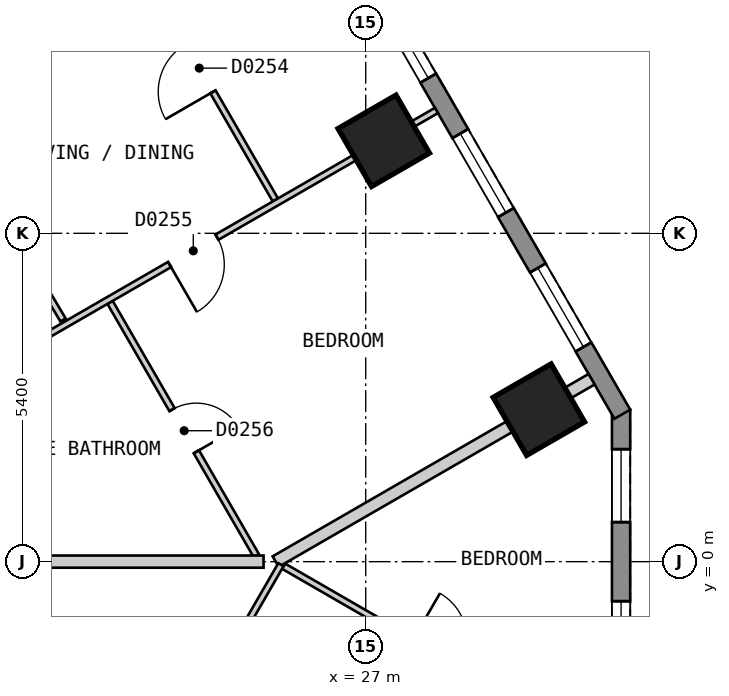
"""IFC4 building model, lengths in metres.
Left out: names, types, materials, properties, quantities, classifications, styles, units other than length and angle.
Written with IfcOpenShell. Run it as: python <this file> out.ifc"""

import sys

from ifc_helpers import new_model, si_unit, direction, frame, frame_2d, origin, origin_2d, place, context, subcontext, project, spatial, polyline, rectangle, outline, extrude, element, fill, save


model = new_model("IFC4")
c1 = context("Model", 3, precision=1e-05, world=origin(), true_north=direction((0.0, 1.0)))
c2 = subcontext(c1, "Body", "Model", "MODEL_VIEW")
j1 = project(units=[si_unit("LENGTHUNIT", "METRE"), si_unit("PLANEANGLEUNIT", "RADIAN")], contexts=[c1])
p1 = place(None, origin())
s1 = spatial("IfcSite", under=j1, at=p1, CompositionType="ELEMENT")
p2 = place(p1, origin())
s2 = spatial("IfcBuilding", under=s1, at=p2, CompositionType="ELEMENT")
p3 = place(p2, frame((0.0, 0.0, 41.4)))
s3 = spatial("IfcBuildingStorey", under=s2, at=p3, CompositionType="ELEMENT", Elevation=41.4)
for number, where, z_axis, x_axis in (
    (1, (29.848, 2.5, 0.0), (0.0, 0.0, 1.0), (-0.5, 0.866, 0.0)),
    (2, (27.297, 6.921, 0.0), (0.0, 0.0, 1.0), (-0.5, 0.866, 0.0)),
):
    element("IfcColumn", number, at=place(p3, frame(where, z_axis=z_axis, x_axis=x_axis)), inside=s3, PredefinedType="COLUMN", context=c2, shape_type="SweptSolid", body=[
        extrude(rectangle(XDim=1.1, YDim=1.1, at=origin_2d()), origin(), (0.0, 0.0, 1.0), 3.0),
    ])
p4 = place(p3, frame((31.2, -2.5, 0.0), z_axis=(0.0, 0.0, 1.0), x_axis=(0.0, 1.0, 0.0)))
e3 = element("IfcWall", 3, at=p4, inside=s3, PredefinedType="SOLIDWALL", context=c2, shape_type="SweptSolid", body=[
    extrude(outline(polyline([(0.0, -0.15), (5.0, -0.15), (4.92, 0.15), (0.08, 0.15), (0.0, -0.15)])), origin(), (0.0, 0.0, 1.0), 2.7),
])
p5 = place(p4, frame((0.65, 0.0, 0.15)))
e4 = element("IfcOpeningElement", 4, at=p5, cuts=e3, PredefinedType="OPENING", context=c2, shape_type="SweptSolid", body=[
    extrude(rectangle(XDim=1.2, YDim=2.1, at=frame_2d((0.6, 1.05))), frame((0.0, 0.16, 0.0), z_axis=(0.0, -1.0, 0.0), x_axis=(1.0, 0.0, 0.0)), (0.0, 0.0, 1.0), 0.32),
])
p6 = place(p4, frame((3.15, 0.0, 0.15)))
e5 = element("IfcOpeningElement", 5, at=p6, cuts=e3, PredefinedType="OPENING", context=c2, shape_type="SweptSolid", body=[
    extrude(rectangle(XDim=1.2, YDim=2.1, at=frame_2d((0.6, 1.05))), frame((0.0, 0.16, 0.0), z_axis=(0.0, -1.0, 0.0), x_axis=(1.0, 0.0, 0.0)), (0.0, 0.0, 1.0), 0.32),
])
p7 = place(p3, frame((31.22, 2.425, 0.0), z_axis=(0.0, 0.0, 1.0), x_axis=(-0.500001938803, 0.866024284413, 0.0)))
e6 = element("IfcWall", 6, at=p7, inside=s3, PredefinedType="SOLIDWALL", context=c2, shape_type="SweptSolid", body=[
    extrude(outline(polyline([(0.0, -0.15), (27.02, -0.15), (26.94, 0.15), (0.08, 0.15), (0.0, -0.15)])), origin(), (0.0, 0.0, 1.0), 2.7),
])
p8 = place(p7, frame((1.277, 0.0, 0.15)))
e7 = element("IfcOpeningElement", 7, at=p8, cuts=e6, PredefinedType="OPENING", context=c2, shape_type="SweptSolid", body=[
    extrude(rectangle(XDim=1.5, YDim=2.1, at=frame_2d((0.75, 1.05))), frame((0.0, 0.16, 0.0), z_axis=(0.0, -1.0, 0.0), x_axis=(1.0, 0.0, 0.0)), (0.0, 0.0, 1.0), 0.32),
])
p9 = place(p7, frame((3.829, 0.0, 0.15)))
e8 = element("IfcOpeningElement", 8, at=p9, cuts=e6, PredefinedType="OPENING", context=c2, shape_type="SweptSolid", body=[
    extrude(rectangle(XDim=1.5, YDim=2.1, at=frame_2d((0.75, 1.05))), frame((0.0, 0.16, 0.0), z_axis=(0.0, -1.0, 0.0), x_axis=(1.0, 0.0, 0.0)), (0.0, 0.0, 1.0), 0.32),
])
p10 = place(p7, frame((6.382, 0.0, 0.15)))
e9 = element("IfcOpeningElement", 9, at=p10, cuts=e6, PredefinedType="OPENING", context=c2, shape_type="SweptSolid", body=[
    extrude(rectangle(XDim=1.5, YDim=2.1, at=frame_2d((0.75, 1.05))), frame((0.0, 0.16, 0.0), z_axis=(0.0, -1.0, 0.0), x_axis=(1.0, 0.0, 0.0)), (0.0, 0.0, 1.0), 0.32),
])
p11 = place(p7, frame((8.933, 0.0, 0.15)))
e10 = element("IfcOpeningElement", 10, at=p11, cuts=e6, PredefinedType="OPENING", context=c2, shape_type="SweptSolid", body=[
    extrude(rectangle(XDim=1.5, YDim=2.1, at=frame_2d((0.75, 1.05))), frame((0.0, 0.16, 0.0), z_axis=(0.0, -1.0, 0.0), x_axis=(1.0, 0.0, 0.0)), (0.0, 0.0, 1.0), 0.32),
])
p12 = place(p7, frame((11.485, 0.0, 0.15)))
e11 = element("IfcOpeningElement", 11, at=p12, cuts=e6, PredefinedType="OPENING", context=c2, shape_type="SweptSolid", body=[
    extrude(rectangle(XDim=1.5, YDim=2.1, at=frame_2d((0.75, 1.05))), frame((0.0, 0.16, 0.0), z_axis=(0.0, -1.0, 0.0), x_axis=(1.0, 0.0, 0.0)), (0.0, 0.0, 1.0), 0.32),
])
p13 = place(p7, frame((14.037, 0.0, 0.15)))
e12 = element("IfcOpeningElement", 12, at=p13, cuts=e6, PredefinedType="OPENING", context=c2, shape_type="SweptSolid", body=[
    extrude(rectangle(XDim=1.5, YDim=2.1, at=frame_2d((0.75, 1.05))), frame((0.0, 0.16, 0.0), z_axis=(0.0, -1.0, 0.0), x_axis=(1.0, 0.0, 0.0)), (0.0, 0.0, 1.0), 0.32),
])
p14 = place(p7, frame((16.589, 0.0, 0.15)))
e13 = element("IfcOpeningElement", 13, at=p14, cuts=e6, PredefinedType="OPENING", context=c2, shape_type="SweptSolid", body=[
    extrude(rectangle(XDim=1.5, YDim=2.1, at=frame_2d((0.75, 1.05))), frame((0.0, 0.16, 0.0), z_axis=(0.0, -1.0, 0.0), x_axis=(1.0, 0.0, 0.0)), (0.0, 0.0, 1.0), 0.32),
])
p15 = place(p7, frame((19.141, 0.0, 0.15)))
e14 = element("IfcOpeningElement", 14, at=p15, cuts=e6, PredefinedType="OPENING", context=c2, shape_type="SweptSolid", body=[
    extrude(rectangle(XDim=1.5, YDim=2.1, at=frame_2d((0.75, 1.05))), frame((0.0, 0.16, 0.0), z_axis=(0.0, -1.0, 0.0), x_axis=(1.0, 0.0, 0.0)), (0.0, 0.0, 1.0), 0.32),
])
p16 = place(p7, frame((21.693, 0.0, 0.15)))
e15 = element("IfcOpeningElement", 15, at=p16, cuts=e6, PredefinedType="OPENING", context=c2, shape_type="SweptSolid", body=[
    extrude(rectangle(XDim=1.5, YDim=2.1, at=frame_2d((0.75, 1.05))), frame((0.0, 0.16, 0.0), z_axis=(0.0, -1.0, 0.0), x_axis=(1.0, 0.0, 0.0)), (0.0, 0.0, 1.0), 0.32),
])
p17 = place(p7, frame((24.244, 0.0, 0.15)))
e16 = element("IfcOpeningElement", 16, at=p17, cuts=e6, PredefinedType="OPENING", context=c2, shape_type="SweptSolid", body=[
    extrude(rectangle(XDim=1.5, YDim=2.1, at=frame_2d((0.75, 1.05))), frame((0.0, 0.16, 0.0), z_axis=(0.0, -1.0, 0.0), x_axis=(1.0, 0.0, 0.0)), (0.0, 0.0, 1.0), 0.32),
])
p18 = place(p3, frame((20.381, 6.741, 0.0), z_axis=(0.0, 0.0, 1.0), x_axis=(0.510224755389, -0.860041103081, 0.0)))
e17 = element("IfcWall", 17, at=p18, inside=s3, PredefinedType="PARTITIONING", context=c2, shape_type="SweptSolid", body=[
    extrude(rectangle(XDim=3.216, YDim=0.1, at=frame_2d((1.608, 0.0))), origin(), (0.0, 0.0, 1.0), 2.7),
])
p19 = place(p3, frame((22.796, 4.264, 0.0), z_axis=(0.0, 0.0, 1.0), x_axis=(0.500099052605, -0.865968208183, 0.0)))
e18 = element("IfcWall", 18, at=p19, inside=s3, PredefinedType="PARTITIONING", context=c2, shape_type="SweptSolid", body=[
    extrude(rectangle(XDim=4.807, YDim=0.1, at=frame_2d((2.404, 0.0))), origin(), (0.0, 0.0, 1.0), 2.7),
])
p20 = place(p19, frame((2.037, 0.0, 0.0)))
e19 = element("IfcOpeningElement", 19, at=p20, cuts=e18, PredefinedType="OPENING", context=c2, shape_type="SweptSolid", body=[
    extrude(rectangle(XDim=0.8, YDim=2.1, at=frame_2d((0.4, 1.05))), frame((0.0, 0.06, 0.0), z_axis=(0.0, -1.0, 0.0), x_axis=(1.0, 0.0, 0.0)), (0.0, 0.0, 1.0), 0.12),
])
p21 = place(p3, frame((23.037, 10.24, 0.0), z_axis=(0.0, 0.0, 1.0), x_axis=(0.499907296314, -0.866078919667, 0.0)))
e20 = element("IfcWall", 20, at=p21, inside=s3, PredefinedType="PARTITIONING", context=c2, shape_type="SweptSolid", body=[
    extrude(rectangle(XDim=4.955, YDim=0.1, at=frame_2d((2.477, 0.0))), origin(), (0.0, 0.0, 1.0), 2.7),
])
p22 = place(p21, frame((2.002, 0.0, 0.0)))
e21 = element("IfcOpeningElement", 21, at=p22, cuts=e20, PredefinedType="OPENING", context=c2, shape_type="SweptSolid", body=[
    extrude(rectangle(XDim=0.9, YDim=2.1, at=frame_2d((0.45, 1.05))), frame((0.0, 0.06, 0.0), z_axis=(0.0, -1.0, 0.0), x_axis=(1.0, 0.0, 0.0)), (0.0, 0.0, 1.0), 0.12),
])
p23 = place(p3, frame((25.649, -0.074, 0.0), z_axis=(0.0, 0.0, 1.0), x_axis=(0.866059819573, -0.499940385368, 0.0)))
e22 = element("IfcWall", 22, at=p23, inside=s3, PredefinedType="PARTITIONING", context=c2, shape_type="SweptSolid", body=[
    extrude(rectangle(XDim=5.851, YDim=0.1, at=frame_2d((2.925, 0.0))), origin(), (0.0, 0.0, 1.0), 2.7),
])
p24 = place(p23, frame((2.45, 0.0, 0.0)))
e23 = element("IfcOpeningElement", 23, at=p24, cuts=e22, PredefinedType="OPENING", context=c2, shape_type="SweptSolid", body=[
    extrude(rectangle(XDim=0.9, YDim=2.1, at=frame_2d((0.45, 1.05))), frame((0.0, 0.06, 0.0), z_axis=(0.0, -1.0, 0.0), x_axis=(1.0, 0.0, 0.0)), (0.0, 0.0, 1.0), 0.12),
])
p25 = place(p3, frame((19.503, 2.421, 0.0), z_axis=(0.0, 0.0, 1.0), x_axis=(0.866065245018, 0.499930986609, 0.0)))
e24 = element("IfcWall", 24, at=p25, inside=s3, PredefinedType="PARTITIONING", context=c2, shape_type="SweptSolid", body=[
    extrude(rectangle(XDim=10.0, YDim=0.1, at=frame_2d((5.0, 0.0))), origin(), (0.0, 0.0, 1.0), 2.7),
])
p26 = place(p25, frame((4.932, 0.0, 0.0)))
e25 = element("IfcOpeningElement", 25, at=p26, cuts=e24, PredefinedType="OPENING", context=c2, shape_type="SweptSolid", body=[
    extrude(rectangle(XDim=0.9, YDim=2.1, at=frame_2d((0.45, 1.05))), frame((0.0, 0.06, 0.0), z_axis=(0.0, -1.0, 0.0), x_axis=(1.0, 0.0, 0.0)), (0.0, 0.0, 1.0), 0.12),
])
p27 = place(p3, frame((20.784, 0.001, 0.0), z_axis=(0.0, 0.0, 1.0), x_axis=(1.0, 0.0, 0.0)))
e26 = element("IfcWall", 26, at=p27, inside=s3, PredefinedType="PARTITIONING", context=c2, shape_type="SweptSolid", body=[
    extrude(rectangle(XDim=4.536, YDim=0.2, at=frame_2d((2.268, 0.0))), origin(), (0.0, 0.0, 1.0), 2.7),
])
p28 = place(p3, frame((25.519, 0.001, 0.0), z_axis=(0.0, 0.0, 1.0), x_axis=(0.86609140076, 0.499885672459, 0.0)))
e27 = element("IfcWall", 27, at=p28, inside=s3, PredefinedType="PARTITIONING", context=c2, shape_type="SweptSolid", body=[
    extrude(rectangle(XDim=6.0, YDim=0.2, at=frame_2d((3.0, 0.0))), origin(), (0.0, 0.0, 1.0), 2.7),
])
p29 = place(p3, frame((16.95, 6.841, 0.0), z_axis=(0.0, 0.0, 1.0), x_axis=(0.866022959057, 0.500004234368, 0.0)))
e28 = element("IfcWall", 28, at=p29, inside=s3, PredefinedType="PARTITIONING", context=c2, shape_type="SweptSolid", body=[
    extrude(rectangle(XDim=10.0, YDim=0.2, at=frame_2d((5.0, 0.0))), origin(), (0.0, 0.0, 1.0), 2.7),
])
p30 = place(p3, frame((23.054, -4.469, 0.0), z_axis=(0.0, 0.0, 1.0), x_axis=(0.500023345639, 0.866011924754, 0.0)))
e29 = element("IfcWall", 29, at=p30, inside=s3, PredefinedType="PARTITIONING", context=c2, shape_type="SweptSolid", body=[
    extrude(rectangle(XDim=5.104, YDim=0.1, at=frame_2d((2.552, 0.0))), origin(), (0.0, 0.0, 1.0), 2.7),
])
p31 = place(p30, frame((2.152, 0.0, 0.0)))
e30 = element("IfcOpeningElement", 30, at=p31, cuts=e29, PredefinedType="OPENING", context=c2, shape_type="SweptSolid", body=[
    extrude(rectangle(XDim=0.8, YDim=2.1, at=frame_2d((0.4, 1.05))), frame((0.0, 0.06, 0.0), z_axis=(0.0, -1.0, 0.0), x_axis=(1.0, 0.0, 0.0)), (0.0, 0.0, 1.0), 0.12),
])
p32 = place(p5, origin())
e31 = element("IfcWindow", 31, at=p32, inside=s3, PartitioningType="SINGLE_PANEL", PredefinedType="WINDOW", context=c2, shape_type="SweptSolid", body=[
    extrude(rectangle(XDim=1.2, YDim=2.1, at=frame_2d((0.6, 1.05))), frame((0.0, 0.03, 0.0), z_axis=(0.0, -1.0, 0.0), x_axis=(1.0, 0.0, 0.0)), (0.0, 0.0, 1.0), 0.06),
])
fill(e4, e31)
p33 = place(p6, origin())
e32 = element("IfcWindow", 32, at=p33, inside=s3, PartitioningType="SINGLE_PANEL", PredefinedType="WINDOW", context=c2, shape_type="SweptSolid", body=[
    extrude(rectangle(XDim=1.2, YDim=2.1, at=frame_2d((0.6, 1.05))), frame((0.0, 0.03, 0.0), z_axis=(0.0, -1.0, 0.0), x_axis=(1.0, 0.0, 0.0)), (0.0, 0.0, 1.0), 0.06),
])
fill(e5, e32)
p34 = place(p8, origin())
e33 = element("IfcWindow", 33, at=p34, inside=s3, PartitioningType="SINGLE_PANEL", PredefinedType="WINDOW", context=c2, shape_type="SweptSolid", body=[
    extrude(rectangle(XDim=1.5, YDim=2.1, at=frame_2d((0.75, 1.05))), frame((0.0, 0.03, 0.0), z_axis=(0.0, -1.0, 0.0), x_axis=(1.0, 0.0, 0.0)), (0.0, 0.0, 1.0), 0.06),
])
fill(e7, e33)
p35 = place(p9, origin())
e34 = element("IfcWindow", 34, at=p35, inside=s3, PartitioningType="SINGLE_PANEL", PredefinedType="WINDOW", context=c2, shape_type="SweptSolid", body=[
    extrude(rectangle(XDim=1.5, YDim=2.1, at=frame_2d((0.75, 1.05))), frame((0.0, 0.03, 0.0), z_axis=(0.0, -1.0, 0.0), x_axis=(1.0, 0.0, 0.0)), (0.0, 0.0, 1.0), 0.06),
])
fill(e8, e34)
p36 = place(p10, origin())
e35 = element("IfcWindow", 35, at=p36, inside=s3, PartitioningType="SINGLE_PANEL", PredefinedType="WINDOW", context=c2, shape_type="SweptSolid", body=[
    extrude(rectangle(XDim=1.5, YDim=2.1, at=frame_2d((0.75, 1.05))), frame((0.0, 0.03, 0.0), z_axis=(0.0, -1.0, 0.0), x_axis=(1.0, 0.0, 0.0)), (0.0, 0.0, 1.0), 0.06),
])
fill(e9, e35)
p37 = place(p22, origin())
e36 = element("IfcDoor", 36, at=p37, inside=s3, OperationType="SINGLE_SWING_RIGHT", PredefinedType="DOOR", context=c2, shape_type="SweptSolid", body=[
    extrude(rectangle(XDim=0.9, YDim=2.1, at=frame_2d((0.45, 1.05))), frame((0.0, 0.025, 0.0), z_axis=(0.0, -1.0, 0.0), x_axis=(1.0, 0.0, 0.0)), (0.0, 0.0, 1.0), 0.05),
])
fill(e21, e36)
p38 = place(p26, origin())
e37 = element("IfcDoor", 37, at=p38, inside=s3, OperationType="SINGLE_SWING_LEFT", PredefinedType="DOOR", context=c2, shape_type="SweptSolid", body=[
    extrude(rectangle(XDim=0.9, YDim=2.1, at=frame_2d((0.45, 1.05))), frame((0.0, 0.025, 0.0), z_axis=(0.0, -1.0, 0.0), x_axis=(1.0, 0.0, 0.0)), (0.0, 0.0, 1.0), 0.05),
])
fill(e25, e37)
p39 = place(p20, origin())
e38 = element("IfcDoor", 38, at=p39, inside=s3, OperationType="SINGLE_SWING_RIGHT", PredefinedType="DOOR", context=c2, shape_type="SweptSolid", body=[
    extrude(rectangle(XDim=0.8, YDim=2.1, at=frame_2d((0.4, 1.05))), frame((0.0, 0.025, 0.0), z_axis=(0.0, -1.0, 0.0), x_axis=(1.0, 0.0, 0.0)), (0.0, 0.0, 1.0), 0.05),
])
fill(e19, e38)
save(model, sys.argv[1])
